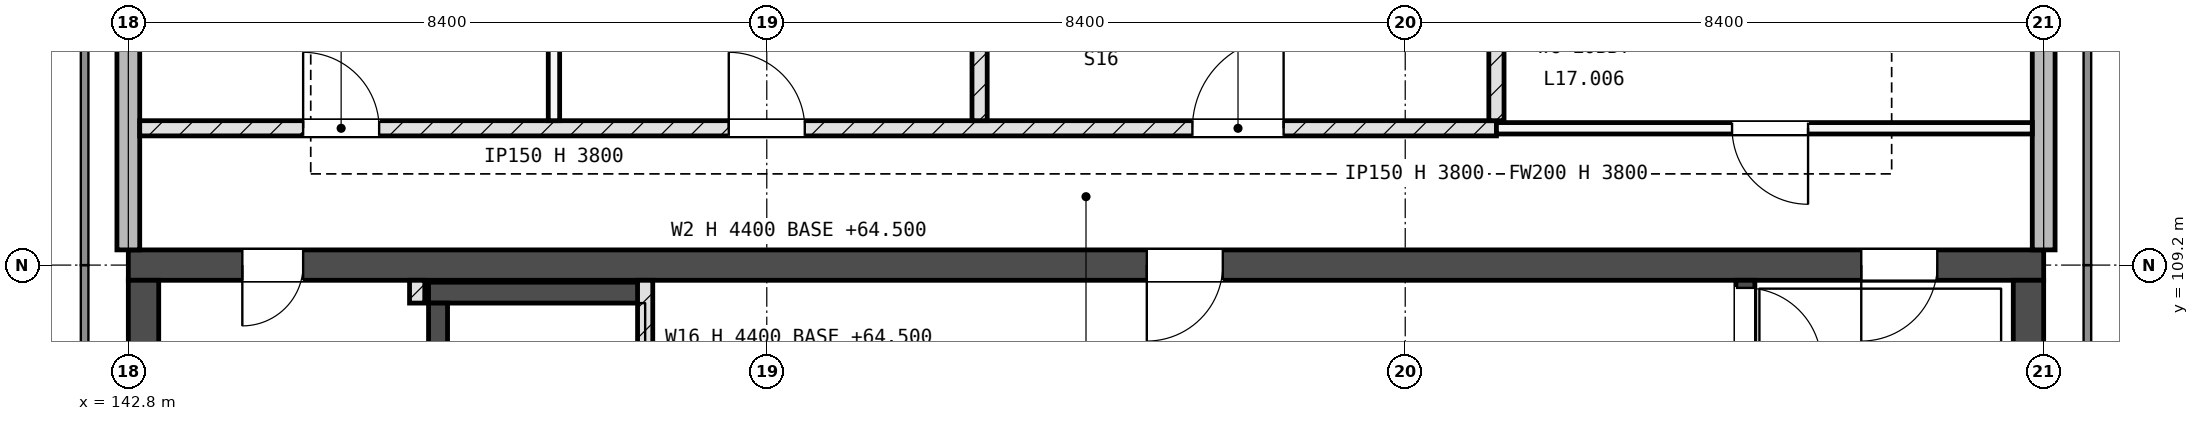
"""IFC4 building model, lengths in metres.
Left out: names, types, materials, properties, quantities, classifications, styles, units other than length and angle.
Written with IfcOpenShell. Run it as: python <this file> out.ifc"""

import sys

from ifc_helpers import new_model, si_unit, direction, frame, frame_2d, origin, place, context, subcontext, project, spatial, rectangle, extrude, element, fill, save


model = new_model("IFC4")
c1 = context("Model", 3, precision=1e-05, world=origin(), true_north=direction((0.0, 1.0)))
c2 = subcontext(c1, "Body", "Model", "MODEL_VIEW")
j1 = project(units=[si_unit("LENGTHUNIT", "METRE"), si_unit("PLANEANGLEUNIT", "RADIAN")], contexts=[c1])
p1 = place(None, origin())
s1 = spatial("IfcSite", under=j1, at=p1, CompositionType="ELEMENT")
p2 = place(p1, origin())
s2 = spatial("IfcBuilding", under=s1, at=p2, CompositionType="ELEMENT")
p3 = place(p2, frame((0.0, 0.0, 64.8)))
s3 = spatial("IfcBuildingStorey", under=s2, at=p3, CompositionType="ELEMENT", Elevation=64.8)
p4 = place(p3, frame((142.8, 109.2, -0.3), z_axis=(0.0, 0.0, 1.0), x_axis=(1.0, 0.0, 0.0)))
e1 = element("IfcWall", 1, at=p4, inside=s3, PredefinedType="SHEAR", context=c2, shape_type="SweptSolid", body=[
    extrude(rectangle(XDim=25.2, YDim=0.4, at=frame_2d((12.6, 0.0))), origin(), (0.0, 0.0, 1.0), 4.4),
])
p5 = place(p4, frame((22.8, 0.0, 0.3)))
e2 = element("IfcOpeningElement", 2, at=p5, cuts=e1, PredefinedType="OPENING", context=c2, shape_type="SweptSolid", body=[
    extrude(rectangle(XDim=1.0, YDim=2.1, at=frame_2d((0.5, 1.05))), frame((0.0, 0.21, 0.0), z_axis=(0.0, -1.0, 0.0), x_axis=(1.0, 0.0, 0.0)), (0.0, 0.0, 1.0), 0.42),
])
p6 = place(p4, frame((1.5, 0.0, 0.3)))
e3 = element("IfcOpeningElement", 3, at=p6, cuts=e1, PredefinedType="OPENING", context=c2, shape_type="SweptSolid", body=[
    extrude(rectangle(XDim=0.8, YDim=2.1, at=frame_2d((0.4, 1.05))), frame((0.0, 0.21, 0.0), z_axis=(0.0, -1.0, 0.0), x_axis=(1.0, 0.0, 0.0)), (0.0, 0.0, 1.0), 0.42),
])
p7 = place(p4, frame((13.4, 0.0, 0.3)))
e4 = element("IfcOpeningElement", 4, at=p7, cuts=e1, PredefinedType="OPENING", context=c2, shape_type="SweptSolid", body=[
    extrude(rectangle(XDim=1.0, YDim=2.1, at=frame_2d((0.5, 1.05))), frame((0.0, 0.21, 0.0), z_axis=(0.0, -1.0, 0.0), x_axis=(1.0, 0.0, 0.0)), (0.0, 0.0, 1.0), 0.42),
])
for number, where, z_axis, x_axis in (
    (5, (143.0, 92.6, -0.3), (0.0, 0.0, 1.0), (0.0, 1.0, 0.0)),
    (6, (167.8, 92.6, -0.3), (0.0, 0.0, 1.0), (0.0, 1.0, 0.0)),
):
    element("IfcWall", number, at=place(p3, frame(where, z_axis=z_axis, x_axis=x_axis)), inside=s3, PredefinedType="SHEAR", context=c2, shape_type="SweptSolid", body=[
        extrude(rectangle(XDim=16.4, YDim=0.4, at=frame_2d((8.2, 0.0))), origin(), (0.0, 0.0, 1.0), 4.4),
    ])
p8 = place(p3, frame((164.075, 101.35, -0.3), z_axis=(0.0, 0.0, 1.0), x_axis=(0.0, 1.0, 0.0)))
e7 = element("IfcWall", 7, at=p8, inside=s3, PredefinedType="SHEAR", context=c2, shape_type="SweptSolid", body=[
    extrude(rectangle(XDim=7.65, YDim=0.25, at=frame_2d((3.825, 0.0))), origin(), (0.0, 0.0, 1.0), 4.4),
])
p9 = place(p8, frame((6.55, 0.0, 0.3)))
e8 = element("IfcOpeningElement", 8, at=p9, cuts=e7, PredefinedType="OPENING", context=c2, shape_type="SweptSolid", body=[
    extrude(rectangle(XDim=1.0, YDim=2.1, at=frame_2d((0.5, 1.05))), frame((0.0, 0.135, 0.0), z_axis=(0.0, -1.0, 0.0), x_axis=(1.0, 0.0, 0.0)), (0.0, 0.0, 1.0), 0.27),
])
p10 = place(p3, frame((146.75, 108.837, -0.3), z_axis=(0.0, 0.0, 1.0), x_axis=(1.0, 0.0, 0.0)))
e9 = element("IfcWall", 9, at=p10, inside=s3, PredefinedType="SHEAR", context=c2, shape_type="SweptSolid", body=[
    extrude(rectangle(XDim=2.85, YDim=0.275, at=frame_2d((1.425, 0.0))), origin(), (0.0, 0.0, 1.0), 4.4),
])
p11 = place(p3, frame((146.875, 105.8, -0.3), z_axis=(0.0, 0.0, 1.0), x_axis=(0.0, 1.0, 0.0)))
e10 = element("IfcWall", 10, at=p11, inside=s3, PredefinedType="SHEAR", context=c2, shape_type="SweptSolid", body=[
    extrude(rectangle(XDim=2.9, YDim=0.25, at=frame_2d((1.45, 0.0))), origin(), (0.0, 0.0, 1.0), 4.4),
])
p12 = place(p3, frame((142.8, 109.4, 0.0), z_axis=(0.0, 0.0, 1.0), x_axis=(0.0, 1.0, 0.0)))
e11 = element("IfcWall", 11, at=p12, inside=s3, PredefinedType="STANDARD", context=c2, shape_type="SweptSolid", body=[
    extrude(rectangle(XDim=7.875, YDim=0.3, at=frame_2d((3.938, 0.0))), origin(), (0.0, 0.0, 1.0), 3.1),
])
p13 = place(p12, frame((2.637, 0.0, 0.9)))
e12 = element("IfcOpeningElement", 12, at=p13, cuts=e11, PredefinedType="OPENING", context=c2, shape_type="SweptSolid", body=[
    extrude(rectangle(XDim=4.2, YDim=1.5, at=frame_2d((2.1, 0.75))), frame((0.0, 0.16, 0.0), z_axis=(0.0, -1.0, 0.0), x_axis=(1.0, 0.0, 0.0)), (0.0, 0.0, 1.0), 0.32),
])
p14 = place(p3, frame((168.0, 109.4, 0.0), z_axis=(0.0, 0.0, 1.0), x_axis=(0.0, 1.0, 0.0)))
e13 = element("IfcWall", 13, at=p14, inside=s3, PredefinedType="STANDARD", context=c2, shape_type="SweptSolid", body=[
    extrude(rectangle(XDim=7.875, YDim=0.3, at=frame_2d((3.938, 0.0))), origin(), (0.0, 0.0, 1.0), 3.8),
])
p15 = place(p14, frame((4.6, 0.0, 2.1)))
e14 = element("IfcOpeningElement", 14, at=p15, cuts=e13, PredefinedType="OPENING", context=c2, shape_type="SweptSolid", body=[
    extrude(rectangle(XDim=0.9, YDim=0.6, at=frame_2d((0.45, 0.3))), frame((0.0, 0.16, 0.0), z_axis=(0.0, -1.0, 0.0), x_axis=(1.0, 0.0, 0.0)), (0.0, 0.0, 1.0), 0.32),
])
p16 = place(p3, frame((142.95, 111.0, 0.0), z_axis=(0.0, 0.0, 1.0), x_axis=(1.0, 0.0, 0.0)))
e15 = element("IfcWall", 15, at=p16, inside=s3, PredefinedType="SOLIDWALL", context=c2, shape_type="SweptSolid", body=[
    extrude(rectangle(XDim=17.85, YDim=0.2, at=frame_2d((8.925, 0.0))), origin(), (0.0, 0.0, 1.0), 3.8),
])
p17 = place(p16, frame((2.15, 0.0, 0.0)))
e16 = element("IfcOpeningElement", 16, at=p17, cuts=e15, PredefinedType="OPENING", context=c2, shape_type="SweptSolid", body=[
    extrude(rectangle(XDim=1.0, YDim=2.1, at=frame_2d((0.5, 1.05))), frame((0.0, 0.11, 0.0), z_axis=(0.0, -1.0, 0.0), x_axis=(1.0, 0.0, 0.0)), (0.0, 0.0, 1.0), 0.22),
])
p18 = place(p16, frame((7.75, 0.0, 0.0)))
e17 = element("IfcOpeningElement", 17, at=p18, cuts=e15, PredefinedType="OPENING", context=c2, shape_type="SweptSolid", body=[
    extrude(rectangle(XDim=1.0, YDim=2.1, at=frame_2d((0.5, 1.05))), frame((0.0, 0.11, 0.0), z_axis=(0.0, -1.0, 0.0), x_axis=(1.0, 0.0, 0.0)), (0.0, 0.0, 1.0), 0.22),
])
p19 = place(p16, frame((13.85, 0.0, 0.0)))
e18 = element("IfcOpeningElement", 18, at=p19, cuts=e15, PredefinedType="OPENING", context=c2, shape_type="SweptSolid", body=[
    extrude(rectangle(XDim=1.2, YDim=2.4, at=frame_2d((0.6, 1.2))), frame((0.0, 0.11, 0.0), z_axis=(0.0, -1.0, 0.0), x_axis=(1.0, 0.0, 0.0)), (0.0, 0.0, 1.0), 0.22),
])
p20 = place(p3, frame((160.8, 111.0, 0.0), z_axis=(0.0, 0.0, 1.0), x_axis=(1.0, 0.0, 0.0)))
e19 = element("IfcWall", 19, at=p20, inside=s3, PredefinedType="PARTITIONING", context=c2, shape_type="SweptSolid", body=[
    extrude(rectangle(XDim=7.05, YDim=0.15, at=frame_2d((3.525, 0.0))), origin(), (0.0, 0.0, 1.0), 3.8),
])
p21 = place(p20, frame((3.1, 0.0, 0.0)))
e20 = element("IfcOpeningElement", 20, at=p21, cuts=e19, PredefinedType="OPENING", context=c2, shape_type="SweptSolid", body=[
    extrude(rectangle(XDim=1.0, YDim=2.1, at=frame_2d((0.5, 1.05))), frame((0.0, 0.085, 0.0), z_axis=(0.0, -1.0, 0.0), x_axis=(1.0, 0.0, 0.0)), (0.0, 0.0, 1.0), 0.17),
])
p22 = place(p3, frame((146.6, 108.7, 0.0), z_axis=(0.0, 0.0, 1.0), x_axis=(0.0, 1.0, 0.0)))
e21 = element("IfcWall", 21, at=p22, inside=s3, PredefinedType="SOLIDWALL", context=c2, shape_type="SweptSolid", body=[
    extrude(rectangle(XDim=0.3, YDim=0.2, at=frame_2d((0.15, 0.0))), origin(), (0.0, 0.0, 1.0), 3.8),
])
p23 = place(p3, frame((148.4, 111.1, 0.0), z_axis=(0.0, 0.0, 1.0), x_axis=(0.0, 1.0, 0.0)))
e22 = element("IfcWall", 22, at=p23, inside=s3, PredefinedType="PARTITIONING", context=c2, shape_type="SweptSolid", body=[
    extrude(rectangle(XDim=6.35, YDim=0.15, at=frame_2d((3.175, 0.0))), origin(), (0.0, 0.0, 1.0), 3.8),
])
p24 = place(p3, frame((149.6, 105.3, 0.0), z_axis=(0.0, 0.0, 1.0), x_axis=(0.0, 1.0, 0.0)))
e23 = element("IfcWall", 23, at=p24, inside=s3, PredefinedType="SOLIDWALL", context=c2, shape_type="SweptSolid", body=[
    extrude(rectangle(XDim=3.7, YDim=0.2, at=frame_2d((1.85, 0.0))), origin(), (0.0, 0.0, 1.0), 3.8),
])
p25 = place(p24, frame((1.4, 0.0, 0.0)))
e24 = element("IfcOpeningElement", 24, at=p25, cuts=e23, PredefinedType="OPENING", context=c2, shape_type="SweptSolid", body=[
    extrude(rectangle(XDim=1.1, YDim=2.1, at=frame_2d((0.55, 1.05))), frame((0.0, 0.11, 0.0), z_axis=(0.0, -1.0, 0.0), x_axis=(1.0, 0.0, 0.0)), (0.0, 0.0, 1.0), 0.22),
])
for number, where, z_axis, x_axis in (
    (25, (154.0, 111.1, 0.0), (0.0, 0.0, 1.0), (0.0, 1.0, 0.0)),
    (26, (160.8, 111.1, 0.0), (0.0, 0.0, 1.0), (0.0, 1.0, 0.0)),
):
    element("IfcWall", number, at=place(p3, frame(where, z_axis=z_axis, x_axis=x_axis)), inside=s3, PredefinedType="SOLIDWALL", context=c2, shape_type="SweptSolid", body=[
        extrude(rectangle(XDim=6.35, YDim=0.2, at=frame_2d((3.175, 0.0))), origin(), (0.0, 0.0, 1.0), 3.8),
    ])
p26 = place(p9, origin())
e27 = element("IfcDoor", 27, at=p26, inside=s3, OperationType="SINGLE_SWING_LEFT", PredefinedType="DOOR", context=c2, shape_type="SweptSolid", body=[
    extrude(rectangle(XDim=1.0, YDim=2.1, at=frame_2d((0.5, 1.05))), frame((0.0, 0.025, 0.0), z_axis=(0.0, -1.0, 0.0), x_axis=(1.0, 0.0, 0.0)), (0.0, 0.0, 1.0), 0.05),
])
fill(e8, e27)
p27 = place(p5, origin())
e28 = element("IfcDoor", 28, at=p27, inside=s3, OperationType="SINGLE_SWING_LEFT", PredefinedType="DOOR", context=c2, shape_type="SweptSolid", body=[
    extrude(rectangle(XDim=1.0, YDim=2.1, at=frame_2d((0.5, 1.05))), frame((0.0, 0.025, 0.0), z_axis=(0.0, -1.0, 0.0), x_axis=(1.0, 0.0, 0.0)), (0.0, 0.0, 1.0), 0.05),
])
fill(e2, e28)
p28 = place(p17, origin())
e29 = element("IfcDoor", 29, at=p28, inside=s3, OperationType="SINGLE_SWING_RIGHT", PredefinedType="DOOR", context=c2, shape_type="SweptSolid", body=[
    extrude(rectangle(XDim=1.0, YDim=2.1, at=frame_2d((0.5, 1.05))), frame((0.0, 0.025, 0.0), z_axis=(0.0, -1.0, 0.0), x_axis=(1.0, 0.0, 0.0)), (0.0, 0.0, 1.0), 0.05),
])
fill(e16, e29)
p29 = place(p18, origin())
e30 = element("IfcDoor", 30, at=p29, inside=s3, OperationType="SINGLE_SWING_RIGHT", PredefinedType="DOOR", context=c2, shape_type="SweptSolid", body=[
    extrude(rectangle(XDim=1.0, YDim=2.1, at=frame_2d((0.5, 1.05))), frame((0.0, 0.025, 0.0), z_axis=(0.0, -1.0, 0.0), x_axis=(1.0, 0.0, 0.0)), (0.0, 0.0, 1.0), 0.05),
])
fill(e17, e30)
p30 = place(p19, origin())
e31 = element("IfcDoor", 31, at=p30, inside=s3, OperationType="SINGLE_SWING_LEFT", PredefinedType="DOOR", context=c2, shape_type="SweptSolid", body=[
    extrude(rectangle(XDim=1.2, YDim=2.4, at=frame_2d((0.6, 1.2))), frame((0.0, 0.025, 0.0), z_axis=(0.0, -1.0, 0.0), x_axis=(1.0, 0.0, 0.0)), (0.0, 0.0, 1.0), 0.05),
])
fill(e18, e31)
p31 = place(p6, origin())
e32 = element("IfcDoor", 32, at=p31, inside=s3, OperationType="SINGLE_SWING_LEFT", PredefinedType="DOOR", context=c2, shape_type="SweptSolid", body=[
    extrude(rectangle(XDim=0.8, YDim=2.1, at=frame_2d((0.4, 1.05))), frame((0.0, 0.025, 0.0), z_axis=(0.0, -1.0, 0.0), x_axis=(1.0, 0.0, 0.0)), (0.0, 0.0, 1.0), 0.05),
])
fill(e3, e32)
p32 = place(p21, origin())
e33 = element("IfcDoor", 33, at=p32, inside=s3, OperationType="SINGLE_SWING_RIGHT", PredefinedType="DOOR", context=c2, shape_type="SweptSolid", body=[
    extrude(rectangle(XDim=1.0, YDim=2.1, at=frame_2d((0.5, 1.05))), frame((0.0, 0.025, 0.0), z_axis=(0.0, -1.0, 0.0), x_axis=(1.0, 0.0, 0.0)), (0.0, 0.0, 1.0), 0.05),
])
fill(e20, e33)
p33 = place(p7, origin())
e34 = element("IfcDoor", 34, at=p33, inside=s3, OperationType="SINGLE_SWING_LEFT", PredefinedType="DOOR", context=c2, shape_type="SweptSolid", body=[
    extrude(rectangle(XDim=1.0, YDim=2.1, at=frame_2d((0.5, 1.05))), frame((0.0, 0.025, 0.0), z_axis=(0.0, -1.0, 0.0), x_axis=(1.0, 0.0, 0.0)), (0.0, 0.0, 1.0), 0.05),
])
fill(e4, e34)
save(model, sys.argv[1])
